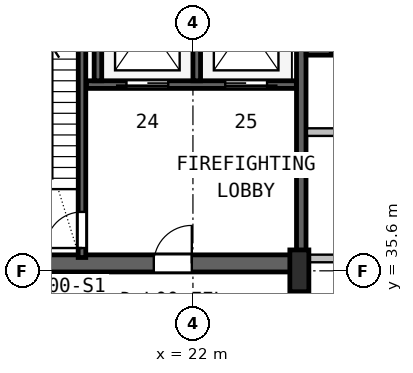
"""IFC4 building model, lengths in metres.
Left out: names, types, materials, properties, quantities, classifications, styles, units other than length and angle.
Written with IfcOpenShell. Run it as: python <this file> out.ifc"""

import sys

from ifc_helpers import new_model, si_unit, direction, frame, frame_2d, origin, origin_2d, place, context, subcontext, project, spatial, rectangle, i_section, extrude, source, transform, mapped, element, fill, save


model = new_model("IFC4")
c1 = context("Model", 3, precision=1e-05, world=origin(), true_north=direction((0.0, 1.0)))
c2 = subcontext(c1, "Body", "Model", "MODEL_VIEW")
j1 = project(units=[si_unit("LENGTHUNIT", "METRE"), si_unit("PLANEANGLEUNIT", "RADIAN")], contexts=[c1])
p1 = place(None, origin())
s1 = spatial("IfcSite", under=j1, at=p1, CompositionType="ELEMENT")
p2 = place(p1, origin())
s2 = spatial("IfcBuilding", under=s1, at=p2, CompositionType="ELEMENT")
p3 = place(p2, origin())
s3 = spatial("IfcBuildingStorey", under=s2, at=p3, CompositionType="ELEMENT", Elevation=0.0)
p4 = place(p3, frame((15.57, 35.795, 0.0), z_axis=(0.0, 0.0, 1.0), x_axis=(1.0, 0.0, 0.0)))
e1 = element("IfcWall", 1, at=p4, inside=s3, PredefinedType="SHEAR", context=c2, shape_type="SweptSolid", body=[
    extrude(rectangle(XDim=9.23, YDim=0.45, at=frame_2d((4.615, 0.0))), origin(), (0.0, 0.0, 1.0), 5.72),
])
p5 = place(p4, frame((5.4, 0.0, 0.0)))
e2 = element("IfcOpeningElement", 2, at=p5, cuts=e1, PredefinedType="OPENING", context=c2, shape_type="SweptSolid", body=[
    extrude(rectangle(XDim=1.0, YDim=2.1, at=frame_2d((0.5, 1.05))), frame((0.0, 0.235, 0.0), z_axis=(0.0, -1.0, 0.0), x_axis=(1.0, 0.0, 0.0)), (0.0, 0.0, 1.0), 0.47),
])
m1 = source(origin(), c2, "Body", "SweptSolid", [
    extrude(i_section(OverallWidth=0.5, OverallDepth=1.1, WebThickness=0.018, FlangeThickness=0.032, FilletRadius=0.018, at=origin_2d()), origin(), (0.0, 0.0, 1.0), 6.0),
])
p6 = place(p3, frame((24.8, 35.6, 0.0), z_axis=(0.0, 0.0, 1.0), x_axis=(1.0, 0.0, 0.0)))
e3 = element("IfcColumn", 3, at=p6, inside=s3, PredefinedType="COLUMN", context=c2, shape_type="MappedRepresentation", body=[
    mapped(m1, transform((0.0, 0.0, 0.0), x_axis=(1.0, 0.0, 0.0), y_axis=(0.0, 1.0, 0.0), z_axis=(0.0, 0.0, 1.0), scale=1.0)),
])
p7 = place(p3, frame((19.08, 35.95, 0.0), z_axis=(0.0, 0.0, 1.0), x_axis=(0.0, 1.0, 0.0)))
e4 = element("IfcWall", 4, at=p7, inside=s3, PredefinedType="SHEAR", context=c2, shape_type="SweptSolid", body=[
    extrude(rectangle(XDim=9.65, YDim=0.2, at=frame_2d((4.825, 0.0))), origin(), (0.0, 0.0, 1.0), 5.72),
])
p8 = place(p7, frame((0.25, 0.0, 0.0)))
e5 = element("IfcOpeningElement", 5, at=p8, cuts=e4, PredefinedType="OPENING", context=c2, shape_type="SweptSolid", body=[
    extrude(rectangle(XDim=0.95, YDim=2.1, at=frame_2d((0.475, 1.05))), frame((0.0, 0.11, 0.0), z_axis=(0.0, -1.0, 0.0), x_axis=(1.0, 0.0, 0.0)), (0.0, 0.0, 1.0), 0.22),
])
p9 = place(p3, frame((24.85, 36.05, 0.0), z_axis=(0.0, 0.0, 1.0), x_axis=(0.0, 1.0, 0.0)))
e6 = element("IfcWall", 6, at=p9, inside=s3, PredefinedType="SHEAR", context=c2, shape_type="SweptSolid", body=[
    extrude(rectangle(XDim=10.45, YDim=0.25, at=frame_2d((5.225, 0.0))), origin(), (0.0, 0.0, 1.0), 5.72),
])
p10 = place(p3, frame((19.2, 40.5, 0.0), z_axis=(0.0, 0.0, 1.0), x_axis=(1.0, 0.0, 0.0)))
e7 = element("IfcWall", 7, at=p10, inside=s3, PredefinedType="SHEAR", context=c2, shape_type="SweptSolid", body=[
    extrude(rectangle(XDim=5.52, YDim=0.2, at=frame_2d((2.76, 0.0))), origin(), (0.0, 0.0, 1.0), 5.72),
])
p11 = place(p10, frame((1.05, 0.0, 0.0)))
e8 = element("IfcOpeningElement", 8, at=p11, cuts=e7, PredefinedType="OPENING", context=c2, shape_type="SweptSolid", body=[
    extrude(rectangle(XDim=1.1, YDim=2.18, at=frame_2d((0.55, 1.09))), frame((0.0, 0.11, 0.0), z_axis=(0.0, -1.0, 0.0), x_axis=(1.0, 0.0, 0.0)), (0.0, 0.0, 1.0), 0.22),
])
p12 = place(p10, frame((3.65, 0.0, 0.0)))
e9 = element("IfcOpeningElement", 9, at=p12, cuts=e7, PredefinedType="OPENING", context=c2, shape_type="SweptSolid", body=[
    extrude(rectangle(XDim=1.1, YDim=2.18, at=frame_2d((0.55, 1.09))), frame((0.0, 0.11, 0.0), z_axis=(0.0, -1.0, 0.0), x_axis=(1.0, 0.0, 0.0)), (0.0, 0.0, 1.0), 0.22),
])
p13 = place(p3, frame((22.1, 40.6, 0.0), z_axis=(0.0, 0.0, 1.0), x_axis=(0.0, 1.0, 0.0)))
e10 = element("IfcWall", 10, at=p13, inside=s3, PredefinedType="SHEAR", context=c2, shape_type="SweptSolid", body=[
    extrude(rectangle(XDim=3.0, YDim=0.2, at=frame_2d((1.5, 0.0))), origin(), (0.0, 0.0, 1.0), 5.72),
])
p14 = place(p3, frame((19.5, 40.6, 0.0), z_axis=(0.0, 0.0, 1.0), x_axis=(0.0, 1.0, 0.0)))
e11 = element("IfcWall", 11, at=p14, inside=s3, PredefinedType="SHEAR", context=c2, shape_type="SweptSolid", body=[
    extrude(rectangle(XDim=5.95, YDim=0.2, at=frame_2d((2.975, 0.0))), origin(), (0.0, 0.0, 1.0), 5.72),
])
p15 = place(p3, frame((24.98, 41.4, 0.0), z_axis=(0.0, 0.0, 1.0), x_axis=(1.0, 0.0, 0.0)))
e12 = element("IfcWall", 12, at=p15, inside=s3, PredefinedType="SHEAR", context=c2, shape_type="SweptSolid", body=[
    extrude(rectangle(XDim=23.82, YDim=0.25, at=frame_2d((11.91, 0.0))), origin(), (0.0, 0.0, 1.0), 5.72),
])
p16 = place(p15, frame((0.87, 0.0, 0.0)))
e13 = element("IfcOpeningElement", 13, at=p16, cuts=e12, PredefinedType="OPENING", context=c2, shape_type="SweptSolid", body=[
    extrude(rectangle(XDim=1.1, YDim=2.18, at=frame_2d((0.55, 1.09))), frame((0.0, 0.135, 0.0), z_axis=(0.0, -1.0, 0.0), x_axis=(1.0, 0.0, 0.0)), (0.0, 0.0, 1.0), 0.27),
])
p17 = place(p15, frame((3.47, 0.0, 0.0)))
e14 = element("IfcOpeningElement", 14, at=p17, cuts=e12, PredefinedType="OPENING", context=c2, shape_type="SweptSolid", body=[
    extrude(rectangle(XDim=1.1, YDim=2.18, at=frame_2d((0.55, 1.09))), frame((0.0, 0.135, 0.0), z_axis=(0.0, -1.0, 0.0), x_axis=(1.0, 0.0, 0.0)), (0.0, 0.0, 1.0), 0.27),
])
p18 = place(p15, frame((6.07, 0.0, 0.0)))
e15 = element("IfcOpeningElement", 15, at=p18, cuts=e12, PredefinedType="OPENING", context=c2, shape_type="SweptSolid", body=[
    extrude(rectangle(XDim=1.1, YDim=2.18, at=frame_2d((0.55, 1.09))), frame((0.0, 0.135, 0.0), z_axis=(0.0, -1.0, 0.0), x_axis=(1.0, 0.0, 0.0)), (0.0, 0.0, 1.0), 0.27),
])
p19 = place(p15, frame((8.87, 0.0, 0.0)))
e16 = element("IfcOpeningElement", 16, at=p19, cuts=e12, PredefinedType="OPENING", context=c2, shape_type="SweptSolid", body=[
    extrude(rectangle(XDim=1.1, YDim=2.18, at=frame_2d((0.55, 1.09))), frame((0.0, 0.135, 0.0), z_axis=(0.0, -1.0, 0.0), x_axis=(1.0, 0.0, 0.0)), (0.0, 0.0, 1.0), 0.27),
])
p20 = place(p15, frame((11.47, 0.0, 0.0)))
e17 = element("IfcOpeningElement", 17, at=p20, cuts=e12, PredefinedType="OPENING", context=c2, shape_type="SweptSolid", body=[
    extrude(rectangle(XDim=1.1, YDim=2.18, at=frame_2d((0.55, 1.09))), frame((0.0, 0.135, 0.0), z_axis=(0.0, -1.0, 0.0), x_axis=(1.0, 0.0, 0.0)), (0.0, 0.0, 1.0), 0.27),
])
p21 = place(p15, frame((14.07, 0.0, 0.0)))
e18 = element("IfcOpeningElement", 18, at=p21, cuts=e12, PredefinedType="OPENING", context=c2, shape_type="SweptSolid", body=[
    extrude(rectangle(XDim=1.1, YDim=2.18, at=frame_2d((0.55, 1.09))), frame((0.0, 0.135, 0.0), z_axis=(0.0, -1.0, 0.0), x_axis=(1.0, 0.0, 0.0)), (0.0, 0.0, 1.0), 0.27),
])
p22 = place(p15, frame((16.87, 0.0, 0.0)))
e19 = element("IfcOpeningElement", 19, at=p22, cuts=e12, PredefinedType="OPENING", context=c2, shape_type="SweptSolid", body=[
    extrude(rectangle(XDim=1.1, YDim=2.18, at=frame_2d((0.55, 1.09))), frame((0.0, 0.135, 0.0), z_axis=(0.0, -1.0, 0.0), x_axis=(1.0, 0.0, 0.0)), (0.0, 0.0, 1.0), 0.27),
])
p23 = place(p15, frame((19.47, 0.0, 0.0)))
e20 = element("IfcOpeningElement", 20, at=p23, cuts=e12, PredefinedType="OPENING", context=c2, shape_type="SweptSolid", body=[
    extrude(rectangle(XDim=1.1, YDim=2.18, at=frame_2d((0.55, 1.09))), frame((0.0, 0.135, 0.0), z_axis=(0.0, -1.0, 0.0), x_axis=(1.0, 0.0, 0.0)), (0.0, 0.0, 1.0), 0.27),
])
p24 = place(p15, frame((22.07, 0.0, 0.0)))
e21 = element("IfcOpeningElement", 21, at=p24, cuts=e12, PredefinedType="OPENING", context=c2, shape_type="SweptSolid", body=[
    extrude(rectangle(XDim=1.1, YDim=2.18, at=frame_2d((0.55, 1.09))), frame((0.0, 0.135, 0.0), z_axis=(0.0, -1.0, 0.0), x_axis=(1.0, 0.0, 0.0)), (0.0, 0.0, 1.0), 0.27),
])
p25 = place(p3, frame((25.0, 35.925, 0.0), z_axis=(0.0, 0.0, 1.0), x_axis=(1.0, 0.0, 0.0)))
e22 = element("IfcWall", 22, at=p25, inside=s3, PredefinedType="PLUMBINGWALL", context=c2, shape_type="SweptSolid", body=[
    extrude(rectangle(XDim=9.75, YDim=0.2, at=frame_2d((4.875, 0.0))), origin(), (0.0, 0.0, 1.0), 4.783),
])
p26 = place(p3, frame((25.0, 39.25, 0.0), z_axis=(0.0, 0.0, 1.0), x_axis=(1.0, 0.0, 0.0)))
e23 = element("IfcWall", 23, at=p26, inside=s3, PredefinedType="PLUMBINGWALL", context=c2, shape_type="SweptSolid", body=[
    extrude(rectangle(XDim=9.75, YDim=0.2, at=frame_2d((4.875, 0.0))), origin(), (0.0, 0.0, 1.0), 5.7),
])
p27 = place(p26, frame((1.75, 0.0, 0.0)))
e24 = element("IfcOpeningElement", 24, at=p27, cuts=e23, PredefinedType="OPENING", context=c2, shape_type="SweptSolid", body=[
    extrude(rectangle(XDim=0.9, YDim=2.06, at=frame_2d((0.45, 1.03))), frame((0.0, 0.11, 0.0), z_axis=(0.0, -1.0, 0.0), x_axis=(1.0, 0.0, 0.0)), (0.0, 0.0, 1.0), 0.22),
])
p28 = place(p26, frame((6.725, 0.0, 0.0)))
e25 = element("IfcOpeningElement", 25, at=p28, cuts=e23, PredefinedType="OPENING", context=c2, shape_type="SweptSolid", body=[
    extrude(rectangle(XDim=0.9, YDim=2.06, at=frame_2d((0.45, 1.03))), frame((0.0, 0.11, 0.0), z_axis=(0.0, -1.0, 0.0), x_axis=(1.0, 0.0, 0.0)), (0.0, 0.0, 1.0), 0.22),
])
m2 = source(origin(), c2, "Body", "SweptSolid", [
    extrude(rectangle(XDim=0.95, YDim=2.1, at=frame_2d((0.475, 1.05))), frame((0.0, 0.025, 0.0), z_axis=(0.0, -1.0, 0.0), x_axis=(1.0, 0.0, 0.0)), (0.0, 0.0, 1.0), 0.05),
])
p29 = place(p8, origin())
e26 = element("IfcDoor", 26, at=p29, inside=s3, OperationType="SINGLE_SWING_LEFT", PredefinedType="DOOR", context=c2, shape_type="MappedRepresentation", body=[
    mapped(m2, transform((0.0, 0.0, 0.0), x_axis=(1.0, 0.0, 0.0), y_axis=(0.0, 1.0, 0.0), z_axis=(0.0, 0.0, 1.0), scale=1.0)),
])
fill(e5, e26)
m3 = source(origin(), c2, "Body", "SweptSolid", [
    extrude(rectangle(XDim=1.0, YDim=2.1, at=frame_2d((0.5, 1.05))), frame((0.0, 0.025, 0.0), z_axis=(0.0, -1.0, 0.0), x_axis=(1.0, 0.0, 0.0)), (0.0, 0.0, 1.0), 0.05),
])
p30 = place(p5, origin())
e27 = element("IfcDoor", 27, at=p30, inside=s3, OperationType="SINGLE_SWING_RIGHT", PredefinedType="DOOR", context=c2, shape_type="MappedRepresentation", body=[
    mapped(m3, transform((0.0, 0.0, 0.0), x_axis=(1.0, 0.0, 0.0), y_axis=(0.0, 1.0, 0.0), z_axis=(0.0, 0.0, 1.0), scale=1.0)),
])
fill(e2, e27)
m4 = source(origin(), c2, "Body", "SweptSolid", [
    extrude(rectangle(XDim=1.1, YDim=2.18, at=frame_2d((0.55, 1.09))), frame((0.0, 0.025, 0.0), z_axis=(0.0, -1.0, 0.0), x_axis=(1.0, 0.0, 0.0)), (0.0, 0.0, 1.0), 0.05),
])
p31 = place(p11, frame((1.1, 0.0, 0.0), z_axis=(0.0, 0.0, 1.0), x_axis=(-1.0, 0.0, 0.0)))
e28 = element("IfcDoor", 28, at=p31, inside=s3, OperationType="SLIDING_TO_LEFT", PredefinedType="DOOR", context=c2, shape_type="MappedRepresentation", body=[
    mapped(m4, transform((0.0, 0.0, 0.0), x_axis=(1.0, 0.0, 0.0), y_axis=(0.0, 1.0, 0.0), z_axis=(0.0, 0.0, 1.0), scale=1.0)),
])
fill(e8, e28)
p32 = place(p12, frame((1.1, 0.0, 0.0), z_axis=(0.0, 0.0, 1.0), x_axis=(-1.0, 0.0, 0.0)))
e29 = element("IfcDoor", 29, at=p32, inside=s3, OperationType="SLIDING_TO_RIGHT", PredefinedType="DOOR", context=c2, shape_type="MappedRepresentation", body=[
    mapped(m4, transform((0.0, 0.0, 0.0), x_axis=(1.0, 0.0, 0.0), y_axis=(0.0, 1.0, 0.0), z_axis=(0.0, 0.0, 1.0), scale=1.0)),
])
fill(e9, e29)
save(model, sys.argv[1])
